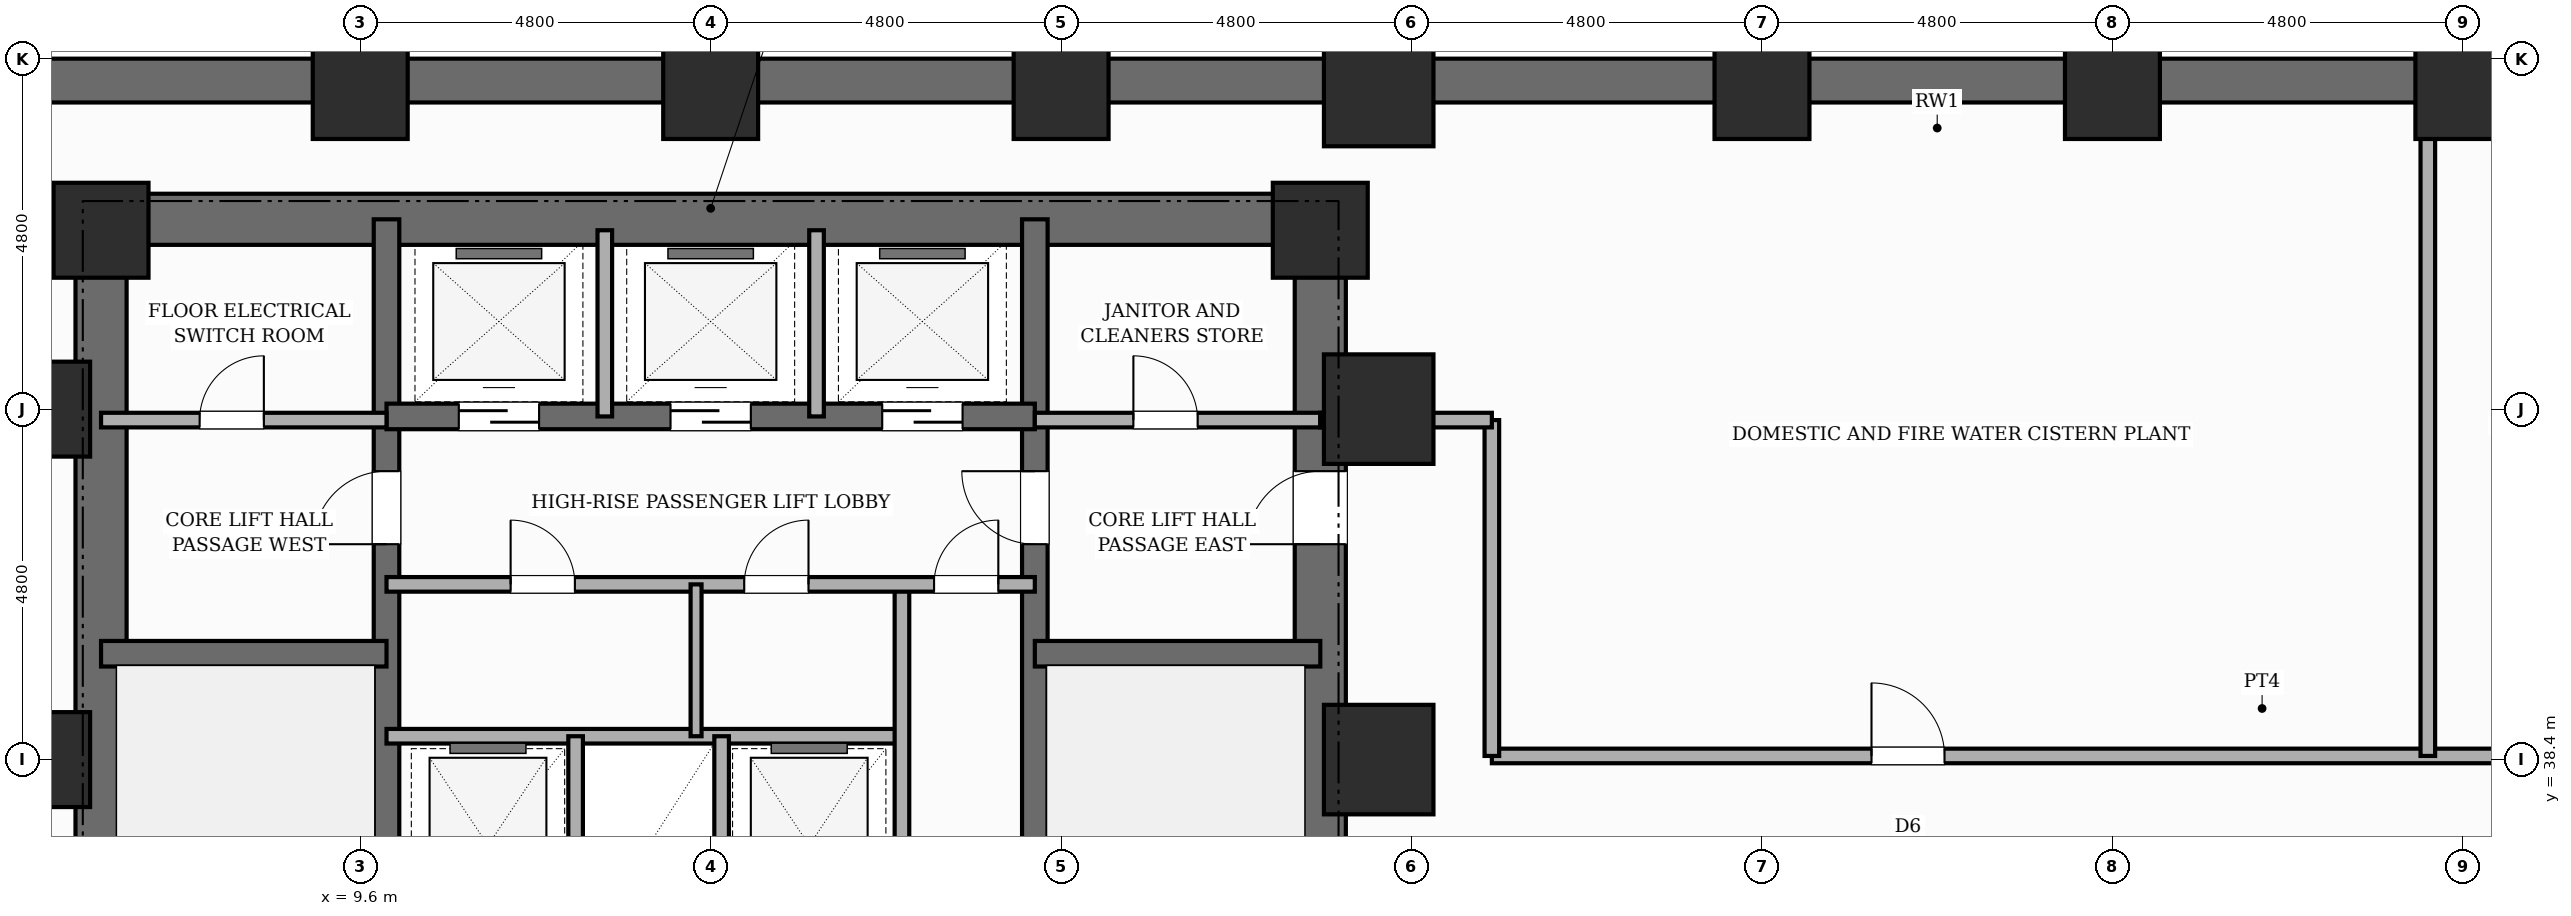
"""IFC4 building model, lengths in metres.
Left out: names, types, materials, properties, quantities, classifications, styles, units other than length and angle.
Written with IfcOpenShell. Run it as: python <this file> out.ifc"""

import sys

from ifc_helpers import new_model, si_unit, direction, frame, frame_2d, origin, origin_2d, place, context, subcontext, project, spatial, rectangle, extrude, element, fill, save


model = new_model("IFC4")
c1 = context("Model", 3, precision=1e-05, world=origin(), true_north=direction((0.0, 1.0)))
c2 = subcontext(c1, "Body", "Model", "MODEL_VIEW")
j1 = project(units=[si_unit("LENGTHUNIT", "METRE"), si_unit("PLANEANGLEUNIT", "RADIAN")], contexts=[c1])
p1 = place(None, origin())
s1 = spatial("IfcSite", under=j1, at=p1, CompositionType="ELEMENT")
p2 = place(p1, origin())
s2 = spatial("IfcBuilding", under=s1, at=p2, CompositionType="ELEMENT")
p3 = place(p2, frame((0.0, 0.0, -4.4)))
s3 = spatial("IfcBuildingStorey", under=s2, at=p3, CompositionType="ELEMENT", Elevation=-4.4)
p4 = place(p3, frame((62.1, 47.7, 0.0), z_axis=(0.0, 0.0, 1.0), x_axis=(-1.0, 0.0, 0.0)))
e1 = element("IfcWall", 1, at=p4, inside=s3, PredefinedType="USERDEFINED", context=c2, shape_type="SweptSolid", body=[
    extrude(rectangle(XDim=61.8, YDim=0.6, at=frame_2d((30.9, 0.0))), origin(), (0.0, 0.0, 1.0), 4.4),
])
p5 = place(p3, frame((6.05, 30.55, 0.0), z_axis=(0.0, 0.0, 1.0), x_axis=(0.0, 1.0, 0.0)))
e2 = element("IfcWall", 2, at=p5, inside=s3, PredefinedType="SHEAR", context=c2, shape_type="SweptSolid", body=[
    extrude(rectangle(XDim=15.6, YDim=0.7, at=frame_2d((7.8, 0.0))), origin(), (0.0, 0.0, 1.0), 4.4),
])
p6 = place(p3, frame((22.75, 30.55, 0.0), z_axis=(0.0, 0.0, 1.0), x_axis=(0.0, 1.0, 0.0)))
e3 = element("IfcWall", 3, at=p6, inside=s3, PredefinedType="SHEAR", context=c2, shape_type="SweptSolid", body=[
    extrude(rectangle(XDim=15.6, YDim=0.7, at=frame_2d((7.8, 0.0))), origin(), (0.0, 0.0, 1.0), 4.4),
])
p7 = place(p6, frame((10.8, 0.0, 0.0)))
e4 = element("IfcOpeningElement", 4, at=p7, cuts=e3, PredefinedType="OPENING", context=c2, shape_type="SweptSolid", body=[
    extrude(rectangle(XDim=1.0, YDim=2.15, at=frame_2d((0.5, 1.075))), frame((0.0, 0.36, 0.0), z_axis=(0.0, -1.0, 0.0), x_axis=(1.0, 0.0, 0.0)), (0.0, 0.0, 1.0), 0.72),
])
p8 = place(p3, frame((6.05, 45.8, 0.0), z_axis=(0.0, 0.0, 1.0), x_axis=(1.0, 0.0, 0.0)))
e5 = element("IfcWall", 5, at=p8, inside=s3, PredefinedType="SHEAR", context=c2, shape_type="SweptSolid", body=[
    extrude(rectangle(XDim=16.7, YDim=0.7, at=frame_2d((8.35, 0.0))), origin(), (0.0, 0.0, 1.0), 4.4),
])
p9 = place(p3, frame((9.96, 30.9, 0.0), z_axis=(0.0, 0.0, 1.0), x_axis=(0.0, 1.0, 0.0)))
e6 = element("IfcWall", 6, at=p9, inside=s3, PredefinedType="SHEAR", context=c2, shape_type="SweptSolid", body=[
    extrude(rectangle(XDim=14.9, YDim=0.35, at=frame_2d((7.45, 0.0))), origin(), (0.0, 0.0, 1.0), 4.4),
])
p10 = place(p9, frame((0.65, 0.0, 0.0)))
e7 = element("IfcOpeningElement", 7, at=p10, cuts=e6, PredefinedType="OPENING", context=c2, shape_type="SweptSolid", body=[
    extrude(rectangle(XDim=0.95, YDim=2.1, at=frame_2d((0.475, 1.05))), frame((0.0, 0.185, 0.0), z_axis=(0.0, -1.0, 0.0), x_axis=(1.0, 0.0, 0.0)), (0.0, 0.0, 1.0), 0.37),
])
p11 = place(p9, frame((10.45, 0.0, 0.0)))
e8 = element("IfcOpeningElement", 8, at=p11, cuts=e6, PredefinedType="OPENING", context=c2, shape_type="SweptSolid", body=[
    extrude(rectangle(XDim=1.0, YDim=2.15, at=frame_2d((0.5, 1.075))), frame((0.0, 0.185, 0.0), z_axis=(0.0, -1.0, 0.0), x_axis=(1.0, 0.0, 0.0)), (0.0, 0.0, 1.0), 0.37),
])
p12 = place(p3, frame((18.84, 30.9, 0.0), z_axis=(0.0, 0.0, 1.0), x_axis=(0.0, 1.0, 0.0)))
e9 = element("IfcWall", 9, at=p12, inside=s3, PredefinedType="SHEAR", context=c2, shape_type="SweptSolid", body=[
    extrude(rectangle(XDim=14.9, YDim=0.35, at=frame_2d((7.45, 0.0))), origin(), (0.0, 0.0, 1.0), 4.4),
])
p13 = place(p12, frame((0.65, 0.0, 0.0)))
e10 = element("IfcOpeningElement", 10, at=p13, cuts=e9, PredefinedType="OPENING", context=c2, shape_type="SweptSolid", body=[
    extrude(rectangle(XDim=0.95, YDim=2.1, at=frame_2d((0.475, 1.05))), frame((0.0, 0.185, 0.0), z_axis=(0.0, -1.0, 0.0), x_axis=(1.0, 0.0, 0.0)), (0.0, 0.0, 1.0), 0.37),
])
p14 = place(p12, frame((10.45, 0.0, 0.0)))
e11 = element("IfcOpeningElement", 11, at=p14, cuts=e9, PredefinedType="OPENING", context=c2, shape_type="SweptSolid", body=[
    extrude(rectangle(XDim=1.0, YDim=2.15, at=frame_2d((0.5, 1.075))), frame((0.0, 0.185, 0.0), z_axis=(0.0, -1.0, 0.0), x_axis=(1.0, 0.0, 0.0)), (0.0, 0.0, 1.0), 0.37),
])
for number, where, z_axis, x_axis in (
    (12, (6.05, 39.85, 0.0), (0.0, 0.0, 1.0), (1.0, 0.0, 0.0)),
    (13, (18.84, 39.85, 0.0), (0.0, 0.0, 1.0), (1.0, 0.0, 0.0)),
):
    element("IfcWall", number, at=place(p3, frame(where, z_axis=z_axis, x_axis=x_axis)), inside=s3, PredefinedType="SHEAR", context=c2, shape_type="SweptSolid", body=[
        extrude(rectangle(XDim=3.91, YDim=0.35, at=frame_2d((1.955, 0.0))), origin(), (0.0, 0.0, 1.0), 4.4),
    ])
p15 = place(p3, frame((9.96, 43.1, 0.0), z_axis=(0.0, 0.0, 1.0), x_axis=(1.0, 0.0, 0.0)))
e14 = element("IfcWall", 14, at=p15, inside=s3, PredefinedType="SHEAR", context=c2, shape_type="SweptSolid", body=[
    extrude(rectangle(XDim=8.88, YDim=0.35, at=frame_2d((4.44, 0.0))), origin(), (0.0, 0.0, 1.0), 4.4),
])
p16 = place(p15, frame((0.99, 0.0, 0.0)))
e15 = element("IfcOpeningElement", 15, at=p16, cuts=e14, PredefinedType="OPENING", context=c2, shape_type="SweptSolid", body=[
    extrude(rectangle(XDim=1.1, YDim=2.15, at=frame_2d((0.55, 1.075))), frame((0.0, 0.185, 0.0), z_axis=(0.0, -1.0, 0.0), x_axis=(1.0, 0.0, 0.0)), (0.0, 0.0, 1.0), 0.37),
])
p17 = place(p15, frame((3.89, 0.0, 0.0)))
e16 = element("IfcOpeningElement", 16, at=p17, cuts=e14, PredefinedType="OPENING", context=c2, shape_type="SweptSolid", body=[
    extrude(rectangle(XDim=1.1, YDim=2.15, at=frame_2d((0.55, 1.075))), frame((0.0, 0.185, 0.0), z_axis=(0.0, -1.0, 0.0), x_axis=(1.0, 0.0, 0.0)), (0.0, 0.0, 1.0), 0.37),
])
p18 = place(p15, frame((6.79, 0.0, 0.0)))
e17 = element("IfcOpeningElement", 17, at=p18, cuts=e14, PredefinedType="OPENING", context=c2, shape_type="SweptSolid", body=[
    extrude(rectangle(XDim=1.1, YDim=2.15, at=frame_2d((0.55, 1.075))), frame((0.0, 0.185, 0.0), z_axis=(0.0, -1.0, 0.0), x_axis=(1.0, 0.0, 0.0)), (0.0, 0.0, 1.0), 0.37),
])
for number, where, z_axis, x_axis in (
    (18, (5.25, 38.4, 0.0), (0.0, 0.0, 1.0), (1.0, 0.0, 0.0)),
    (19, (5.25, 43.2, 0.0), (0.0, 0.0, 1.0), (1.0, 0.0, 0.0)),
    (20, (6.05, 45.65, 0.0), (0.0, 0.0, 1.0), (1.0, 0.0, 0.0)),
    (21, (9.6, 47.55, 0.0), (0.0, 0.0, 1.0), (1.0, 0.0, 0.0)),
    (22, (14.4, 47.55, 0.0), (0.0, 0.0, 1.0), (1.0, 0.0, 0.0)),
    (23, (19.2, 47.55, 0.0), (0.0, 0.0, 1.0), (1.0, 0.0, 0.0)),
    (24, (22.75, 45.65, 0.0), (0.0, 0.0, 1.0), (1.0, 0.0, 0.0)),
):
    element("IfcColumn", number, at=place(p3, frame(where, z_axis=z_axis, x_axis=x_axis)), inside=s3, PredefinedType="COLUMN", context=c2, shape_type="SweptSolid", body=[
        extrude(rectangle(XDim=1.3, YDim=1.3, at=origin_2d()), origin(), (0.0, 0.0, 1.0), 4.4),
    ])
for number, where, z_axis, x_axis in (
    (25, (23.55, 38.4, 0.0), (0.0, 0.0, 1.0), (1.0, 0.0, 0.0)),
    (26, (23.55, 43.2, 0.0), (0.0, 0.0, 1.0), (1.0, 0.0, 0.0)),
    (27, (23.55, 47.55, 0.0), (0.0, 0.0, 1.0), (1.0, 0.0, 0.0)),
):
    element("IfcColumn", number, at=place(p3, frame(where, z_axis=z_axis, x_axis=x_axis)), inside=s3, PredefinedType="USERDEFINED", context=c2, shape_type="SweptSolid", body=[
        extrude(rectangle(XDim=1.5, YDim=1.5, at=origin_2d()), origin(), (0.0, 0.0, 1.0), 4.4),
    ])
for number, where, z_axis, x_axis in (
    (28, (28.8, 47.55, 0.0), (0.0, 0.0, 1.0), (1.0, 0.0, 0.0)),
    (29, (33.6, 47.55, 0.0), (0.0, 0.0, 1.0), (1.0, 0.0, 0.0)),
    (30, (38.4, 47.55, 0.0), (0.0, 0.0, 1.0), (1.0, 0.0, 0.0)),
):
    element("IfcColumn", number, at=place(p3, frame(where, z_axis=z_axis, x_axis=x_axis)), inside=s3, PredefinedType="COLUMN", context=c2, shape_type="SweptSolid", body=[
        extrude(rectangle(XDim=1.3, YDim=1.3, at=origin_2d()), origin(), (0.0, 0.0, 1.0), 4.4),
    ])
p19 = place(p3, frame((9.96, 38.72, 0.0), z_axis=(0.0, 0.0, 1.0), x_axis=(1.0, 0.0, 0.0)))
e31 = element("IfcWall", 31, at=p19, inside=s3, PredefinedType="POLYGONAL", context=c2, shape_type="SweptSolid", body=[
    extrude(rectangle(XDim=7.06, YDim=0.2, at=frame_2d((3.53, 0.0))), origin(), (0.0, 0.0, 1.0), 4.05),
])
for number, where, z_axis, x_axis in (
    (32, (12.55, 35.65, 0.0), (0.0, 0.0, 1.0), (0.0, 1.0, 0.0)),
    (33, (14.55, 35.65, 0.0), (0.0, 0.0, 1.0), (0.0, 1.0, 0.0)),
):
    element("IfcWall", number, at=place(p3, frame(where, z_axis=z_axis, x_axis=x_axis)), inside=s3, PredefinedType="POLYGONAL", context=c2, shape_type="SweptSolid", body=[
        extrude(rectangle(XDim=3.07, YDim=0.2, at=frame_2d((1.535, 0.0))), origin(), (0.0, 0.0, 1.0), 4.05),
    ])
p20 = place(p3, frame((17.02, 35.65, 0.0), z_axis=(0.0, 0.0, 1.0), x_axis=(0.0, 1.0, 0.0)))
e34 = element("IfcWall", 34, at=p20, inside=s3, PredefinedType="POLYGONAL", context=c2, shape_type="SweptSolid", body=[
    extrude(rectangle(XDim=5.15, YDim=0.2, at=frame_2d((2.575, 0.0))), origin(), (0.0, 0.0, 1.0), 4.05),
])
p21 = place(p3, frame((9.96, 40.8, 0.0), z_axis=(0.0, 0.0, 1.0), x_axis=(1.0, 0.0, 0.0)))
e35 = element("IfcWall", 35, at=p21, inside=s3, PredefinedType="POLYGONAL", context=c2, shape_type="SweptSolid", body=[
    extrude(rectangle(XDim=8.88, YDim=0.2, at=frame_2d((4.44, 0.0))), origin(), (0.0, 0.0, 1.0), 4.05),
])
p22 = place(p21, frame((7.5, 0.0, 0.0)))
e36 = element("IfcOpeningElement", 36, at=p22, cuts=e35, PredefinedType="OPENING", context=c2, shape_type="SweptSolid", body=[
    extrude(rectangle(XDim=0.88, YDim=2.1, at=frame_2d((0.44, 1.05))), frame((0.0, 0.11, 0.0), z_axis=(0.0, -1.0, 0.0), x_axis=(1.0, 0.0, 0.0)), (0.0, 0.0, 1.0), 0.22),
])
p23 = place(p21, frame((1.7, 0.0, 0.0)))
e37 = element("IfcOpeningElement", 37, at=p23, cuts=e35, PredefinedType="OPENING", context=c2, shape_type="SweptSolid", body=[
    extrude(rectangle(XDim=0.88, YDim=2.1, at=frame_2d((0.44, 1.05))), frame((0.0, 0.11, 0.0), z_axis=(0.0, -1.0, 0.0), x_axis=(1.0, 0.0, 0.0)), (0.0, 0.0, 1.0), 0.22),
])
p24 = place(p21, frame((4.9, 0.0, 0.0)))
e38 = element("IfcOpeningElement", 38, at=p24, cuts=e35, PredefinedType="OPENING", context=c2, shape_type="SweptSolid", body=[
    extrude(rectangle(XDim=0.88, YDim=2.1, at=frame_2d((0.44, 1.05))), frame((0.0, 0.11, 0.0), z_axis=(0.0, -1.0, 0.0), x_axis=(1.0, 0.0, 0.0)), (0.0, 0.0, 1.0), 0.22),
])
p25 = place(p3, frame((18.84, 43.05, 0.0), z_axis=(0.0, 0.0, 1.0), x_axis=(1.0, 0.0, 0.0)))
e39 = element("IfcWall", 39, at=p25, inside=s3, PredefinedType="POLYGONAL", context=c2, shape_type="SweptSolid", body=[
    extrude(rectangle(XDim=3.91, YDim=0.2, at=frame_2d((1.955, 0.0))), origin(), (0.0, 0.0, 1.0), 3.28),
])
p26 = place(p25, frame((1.35, 0.0, 0.0)))
e40 = element("IfcOpeningElement", 40, at=p26, cuts=e39, PredefinedType="OPENING", context=c2, shape_type="SweptSolid", body=[
    extrude(rectangle(XDim=0.88, YDim=2.1, at=frame_2d((0.44, 1.05))), frame((0.0, 0.11, 0.0), z_axis=(0.0, -1.0, 0.0), x_axis=(1.0, 0.0, 0.0)), (0.0, 0.0, 1.0), 0.22),
])
p27 = place(p3, frame((6.05, 43.05, 0.0), z_axis=(0.0, 0.0, 1.0), x_axis=(1.0, 0.0, 0.0)))
e41 = element("IfcWall", 41, at=p27, inside=s3, PredefinedType="POLYGONAL", context=c2, shape_type="SweptSolid", body=[
    extrude(rectangle(XDim=3.91, YDim=0.2, at=frame_2d((1.955, 0.0))), origin(), (0.0, 0.0, 1.0), 3.28),
])
p28 = place(p27, frame((1.35, 0.0, 0.0)))
e42 = element("IfcOpeningElement", 42, at=p28, cuts=e41, PredefinedType="OPENING", context=c2, shape_type="SweptSolid", body=[
    extrude(rectangle(XDim=0.88, YDim=2.1, at=frame_2d((0.44, 1.05))), frame((0.0, 0.11, 0.0), z_axis=(0.0, -1.0, 0.0), x_axis=(1.0, 0.0, 0.0)), (0.0, 0.0, 1.0), 0.22),
])
for number, where, z_axis, x_axis in (
    (43, (12.95, 43.1, 0.0), (0.0, 0.0, 1.0), (0.0, 1.0, 0.0)),
    (44, (15.85, 43.1, 0.0), (0.0, 0.0, 1.0), (0.0, 1.0, 0.0)),
):
    element("IfcWall", number, at=place(p3, frame(where, z_axis=z_axis, x_axis=x_axis)), inside=s3, PredefinedType="POLYGONAL", context=c2, shape_type="SweptSolid", body=[
        extrude(rectangle(XDim=2.55, YDim=0.2, at=frame_2d((1.275, 0.0))), origin(), (0.0, 0.0, 1.0), 4.05),
    ])
p29 = place(p3, frame((14.2, 38.72, 0.0), z_axis=(0.0, 0.0, 1.0), x_axis=(0.0, 1.0, 0.0)))
e45 = element("IfcWall", 45, at=p29, inside=s3, PredefinedType="PARTITIONING", context=c2, shape_type="SweptSolid", body=[
    extrude(rectangle(XDim=2.08, YDim=0.15, at=frame_2d((1.04, 0.0))), origin(), (0.0, 0.0, 1.0), 4.05),
])
p30 = place(p3, frame((25.1, 38.45, 0.0), z_axis=(0.0, 0.0, 1.0), x_axis=(1.0, 0.0, 0.0)))
e46 = element("IfcWall", 46, at=p30, inside=s3, PredefinedType="PARTITIONING", context=c2, shape_type="SweptSolid", body=[
    extrude(rectangle(XDim=18.92, YDim=0.2, at=frame_2d((9.46, 0.0))), origin(), (0.0, 0.0, 1.0), 4.05),
])
p31 = place(p30, frame((5.2, 0.0, 0.0)))
e47 = element("IfcOpeningElement", 47, at=p31, cuts=e46, PredefinedType="OPENING", context=c2, shape_type="SweptSolid", body=[
    extrude(rectangle(XDim=1.0, YDim=2.15, at=frame_2d((0.5, 1.075))), frame((0.0, 0.11, 0.0), z_axis=(0.0, -1.0, 0.0), x_axis=(1.0, 0.0, 0.0)), (0.0, 0.0, 1.0), 0.22),
])
p32 = place(p30, frame((14.9, 0.0, 0.0)))
e48 = element("IfcOpeningElement", 48, at=p32, cuts=e46, PredefinedType="OPENING", context=c2, shape_type="SweptSolid", body=[
    extrude(rectangle(XDim=1.0, YDim=2.15, at=frame_2d((0.5, 1.075))), frame((0.0, 0.11, 0.0), z_axis=(0.0, -1.0, 0.0), x_axis=(1.0, 0.0, 0.0)), (0.0, 0.0, 1.0), 0.22),
])
p33 = place(p3, frame((25.1, 38.45, 0.0), z_axis=(0.0, 0.0, 1.0), x_axis=(0.0, 1.0, 0.0)))
e49 = element("IfcWall", 49, at=p33, inside=s3, PredefinedType="PARTITIONING", context=c2, shape_type="SweptSolid", body=[
    extrude(rectangle(XDim=4.6, YDim=0.2, at=frame_2d((2.3, 0.0))), origin(), (0.0, 0.0, 1.0), 4.05),
])
p34 = place(p3, frame((22.75, 43.05, 0.0), z_axis=(0.0, 0.0, 1.0), x_axis=(1.0, 0.0, 0.0)))
e50 = element("IfcWall", 50, at=p34, inside=s3, PredefinedType="PARTITIONING", context=c2, shape_type="SweptSolid", body=[
    extrude(rectangle(XDim=2.35, YDim=0.2, at=frame_2d((1.175, 0.0))), origin(), (0.0, 0.0, 1.0), 3.28),
])
p35 = place(p3, frame((37.92, 38.45, 0.0), z_axis=(0.0, 0.0, 1.0), x_axis=(0.0, 1.0, 0.0)))
e51 = element("IfcWall", 51, at=p35, inside=s3, PredefinedType="PARTITIONING", context=c2, shape_type="SweptSolid", body=[
    extrude(rectangle(XDim=8.95, YDim=0.2, at=frame_2d((4.475, 0.0))), origin(), (0.0, 0.0, 1.0), 3.28),
])
p36 = place(p22, origin())
e52 = element("IfcDoor", 52, at=p36, inside=s3, OperationType="SINGLE_SWING_RIGHT", PredefinedType="DOOR", context=c2, shape_type="SweptSolid", body=[
    extrude(rectangle(XDim=0.88, YDim=2.1, at=frame_2d((0.44, 1.05))), frame((0.0, 0.025, 0.0), z_axis=(0.0, -1.0, 0.0), x_axis=(1.0, 0.0, 0.0)), (0.0, 0.0, 1.0), 0.05),
])
fill(e36, e52)
p37 = place(p16, origin())
e53 = element("IfcDoor", 53, at=p37, inside=s3, OperationType="SLIDING_TO_LEFT", PredefinedType="DOOR", context=c2, shape_type="SweptSolid", body=[
    extrude(rectangle(XDim=1.1, YDim=2.15, at=frame_2d((0.55, 1.075))), frame((0.0, 0.025, 0.0), z_axis=(0.0, -1.0, 0.0), x_axis=(1.0, 0.0, 0.0)), (0.0, 0.0, 1.0), 0.05),
])
fill(e15, e53)
p38 = place(p17, origin())
e54 = element("IfcDoor", 54, at=p38, inside=s3, OperationType="SLIDING_TO_RIGHT", PredefinedType="DOOR", context=c2, shape_type="SweptSolid", body=[
    extrude(rectangle(XDim=1.1, YDim=2.15, at=frame_2d((0.55, 1.075))), frame((0.0, 0.025, 0.0), z_axis=(0.0, -1.0, 0.0), x_axis=(1.0, 0.0, 0.0)), (0.0, 0.0, 1.0), 0.05),
])
fill(e16, e54)
p39 = place(p18, origin())
e55 = element("IfcDoor", 55, at=p39, inside=s3, OperationType="SLIDING_TO_LEFT", PredefinedType="DOOR", context=c2, shape_type="SweptSolid", body=[
    extrude(rectangle(XDim=1.1, YDim=2.15, at=frame_2d((0.55, 1.075))), frame((0.0, 0.025, 0.0), z_axis=(0.0, -1.0, 0.0), x_axis=(1.0, 0.0, 0.0)), (0.0, 0.0, 1.0), 0.05),
])
fill(e17, e55)
p40 = place(p11, origin())
e56 = element("IfcDoor", 56, at=p40, inside=s3, OperationType="SINGLE_SWING_LEFT", PredefinedType="DOOR", context=c2, shape_type="SweptSolid", body=[
    extrude(rectangle(XDim=1.0, YDim=2.15, at=frame_2d((0.5, 1.075))), frame((0.0, 0.025, 0.0), z_axis=(0.0, -1.0, 0.0), x_axis=(1.0, 0.0, 0.0)), (0.0, 0.0, 1.0), 0.05),
])
fill(e8, e56)
p41 = place(p14, origin())
e57 = element("IfcDoor", 57, at=p41, inside=s3, OperationType="SINGLE_SWING_RIGHT", PredefinedType="DOOR", context=c2, shape_type="SweptSolid", body=[
    extrude(rectangle(XDim=1.0, YDim=2.15, at=frame_2d((0.5, 1.075))), frame((0.0, 0.025, 0.0), z_axis=(0.0, -1.0, 0.0), x_axis=(1.0, 0.0, 0.0)), (0.0, 0.0, 1.0), 0.05),
])
fill(e11, e57)
p42 = place(p7, origin())
e58 = element("IfcDoor", 58, at=p42, inside=s3, OperationType="SINGLE_SWING_LEFT", PredefinedType="DOOR", context=c2, shape_type="SweptSolid", body=[
    extrude(rectangle(XDim=1.0, YDim=2.15, at=frame_2d((0.5, 1.075))), frame((0.0, 0.025, 0.0), z_axis=(0.0, -1.0, 0.0), x_axis=(1.0, 0.0, 0.0)), (0.0, 0.0, 1.0), 0.05),
])
fill(e4, e58)
p43 = place(p28, origin())
e59 = element("IfcDoor", 59, at=p43, inside=s3, OperationType="SINGLE_SWING_RIGHT", PredefinedType="DOOR", context=c2, shape_type="SweptSolid", body=[
    extrude(rectangle(XDim=0.88, YDim=2.1, at=frame_2d((0.44, 1.05))), frame((0.0, 0.025, 0.0), z_axis=(0.0, -1.0, 0.0), x_axis=(1.0, 0.0, 0.0)), (0.0, 0.0, 1.0), 0.05),
])
fill(e42, e59)
p44 = place(p23, origin())
e60 = element("IfcDoor", 60, at=p44, inside=s3, OperationType="SINGLE_SWING_LEFT", PredefinedType="DOOR", context=c2, shape_type="SweptSolid", body=[
    extrude(rectangle(XDim=0.88, YDim=2.1, at=frame_2d((0.44, 1.05))), frame((0.0, 0.025, 0.0), z_axis=(0.0, -1.0, 0.0), x_axis=(1.0, 0.0, 0.0)), (0.0, 0.0, 1.0), 0.05),
])
fill(e37, e60)
p45 = place(p24, origin())
e61 = element("IfcDoor", 61, at=p45, inside=s3, OperationType="SINGLE_SWING_RIGHT", PredefinedType="DOOR", context=c2, shape_type="SweptSolid", body=[
    extrude(rectangle(XDim=0.88, YDim=2.1, at=frame_2d((0.44, 1.05))), frame((0.0, 0.025, 0.0), z_axis=(0.0, -1.0, 0.0), x_axis=(1.0, 0.0, 0.0)), (0.0, 0.0, 1.0), 0.05),
])
fill(e38, e61)
p46 = place(p26, origin())
e62 = element("IfcDoor", 62, at=p46, inside=s3, OperationType="SINGLE_SWING_LEFT", PredefinedType="DOOR", context=c2, shape_type="SweptSolid", body=[
    extrude(rectangle(XDim=0.88, YDim=2.1, at=frame_2d((0.44, 1.05))), frame((0.0, 0.025, 0.0), z_axis=(0.0, -1.0, 0.0), x_axis=(1.0, 0.0, 0.0)), (0.0, 0.0, 1.0), 0.05),
])
fill(e40, e62)
p47 = place(p31, origin())
e63 = element("IfcDoor", 63, at=p47, inside=s3, OperationType="SINGLE_SWING_LEFT", PredefinedType="DOOR", context=c2, shape_type="SweptSolid", body=[
    extrude(rectangle(XDim=1.0, YDim=2.15, at=frame_2d((0.5, 1.075))), frame((0.0, 0.025, 0.0), z_axis=(0.0, -1.0, 0.0), x_axis=(1.0, 0.0, 0.0)), (0.0, 0.0, 1.0), 0.05),
])
fill(e47, e63)
save(model, sys.argv[1])
